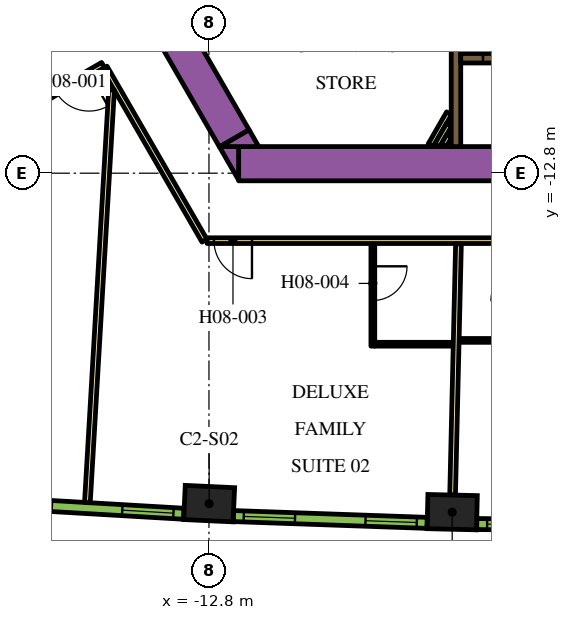
"""IFC4 building model, lengths in metres.
Left out: names, types, materials, properties, quantities, classifications, styles, units other than length and angle.
Written with IfcOpenShell. Run it as: python <this file> out.ifc"""

import sys

from ifc_helpers import new_model, si_unit, direction, frame, frame_2d, origin, origin_2d, place, context, subcontext, project, spatial, polyline, rectangle, outline, extrude, element, fill, save


model = new_model("IFC4")
c1 = context("Model", 3, precision=1e-05, world=origin(), true_north=direction((0.0, 1.0)))
c2 = subcontext(c1, "Body", "Model", "MODEL_VIEW")
j1 = project(units=[si_unit("LENGTHUNIT", "METRE"), si_unit("PLANEANGLEUNIT", "RADIAN")], contexts=[c1])
p1 = place(None, origin())
s1 = spatial("IfcSite", under=j1, at=p1, CompositionType="ELEMENT")
p2 = place(p1, origin())
s2 = spatial("IfcBuilding", under=s1, at=p2, CompositionType="ELEMENT")
p3 = place(p2, frame((0.0, 0.0, 111.0)))
s3 = spatial("IfcBuildingStorey", under=s2, at=p3, CompositionType="ELEMENT", Elevation=111.0)
for number, where, z_axis, x_axis in (
    (1, (-12.795, -21.494, 0.0), (0.0, 0.0, 1.0), (0.999, -0.047, 0.0)),
    (2, (-6.399, -21.719, 0.0), (0.0, 0.0, 1.0), (1.0, -0.023, 0.0)),
):
    element("IfcColumn", number, at=place(p3, frame(where, z_axis=z_axis, x_axis=x_axis)), inside=s3, PredefinedType="COLUMN", context=c2, shape_type="SweptSolid", body=[
        extrude(rectangle(XDim=1.3, YDim=0.9, at=origin_2d()), origin(), (0.0, 0.0, 1.0), 3.9),
    ])
p4 = place(p3, frame((-12.019, -12.55, 0.0), z_axis=(0.0, 0.0, 1.0), x_axis=(1.0, 0.0, 0.0)))
e3 = element("IfcWall", 3, at=p4, inside=s3, PredefinedType="SOLIDWALL", context=c2, shape_type="SweptSolid", body=[
    extrude(rectangle(XDim=21.63, YDim=0.9, at=frame_2d((10.815, 0.0))), origin(), (0.0, 0.0, 1.0), 3.9),
])
p5 = place(p3, origin())
e4 = element("IfcWall", 4, at=p5, inside=s3, PredefinedType="SOLIDWALL", context=c2, shape_type="SweptSolid", body=[
    extrude(outline(polyline([(-12.529, -12.1), (-12.021, -12.1), (-12.021, -12.98), (-12.529, -12.1)])), origin(), (0.0, 0.0, 1.0), 3.9),
])
p6 = place(p3, frame((-12.134, -11.883, 0.0), z_axis=(0.0, 0.0, 1.0), x_axis=(-0.500005339912, 0.866022320763, 0.0)))
e5 = element("IfcWall", 5, at=p6, inside=s3, PredefinedType="SOLIDWALL", context=c2, shape_type="SweptSolid", body=[
    extrude(rectangle(XDim=9.488, YDim=0.9, at=frame_2d((4.744, 0.0))), origin(), (0.0, 0.0, 1.0), 3.9),
])
e6 = element("IfcWall", 6, at=p5, inside=s3, PredefinedType="SOLIDWALL", context=c2, shape_type="SweptSolid", body=[
    extrude(outline(polyline([(-11.489, -12.1), (-12.505, -12.1), (-11.743, -11.66), (-11.489, -12.1)])), origin(), (0.0, 0.0, 1.0), 3.9),
])
p7 = place(p3, frame((-6.3, -12.1, 0.0), z_axis=(0.0, 0.0, 1.0), x_axis=(0.0, 1.0, 0.0)))
e7 = element("IfcWall", 7, at=p7, inside=s3, PredefinedType="SOLIDWALL", context=c2, shape_type="SweptSolid", body=[
    extrude(rectangle(XDim=3.146, YDim=0.25, at=frame_2d((1.573, 0.0))), origin(), (0.0, 0.0, 1.0), 3.9),
])
p8 = place(p3, frame((-6.968, -12.068, 0.0), z_axis=(0.0, 0.0, 1.0), x_axis=(0.49998975084, 0.866031321059, 0.0)))
e8 = element("IfcWall", 8, at=p8, inside=s3, PredefinedType="PARTITIONING", context=c2, shape_type="SweptSolid", body=[
    extrude(rectangle(XDim=0.975, YDim=0.15, at=frame_2d((0.488, 0.0))), origin(), (0.0, 0.0, 1.0), 2.75),
])
p9 = place(p3, frame((-6.794, -12.068, 0.0), z_axis=(0.0, 0.0, 1.0), x_axis=(0.49985693963, 0.866107983974, 0.0)))
e9 = element("IfcWall", 9, at=p9, inside=s3, PredefinedType="PARTITIONING", context=c2, shape_type="SweptSolid", body=[
    extrude(rectangle(XDim=0.629, YDim=0.15, at=frame_2d((0.314, 0.0))), origin(), (0.0, 0.0, 1.0), 2.75),
])
p10 = place(p3, frame((-6.621, -12.068, 0.0), z_axis=(0.0, 0.0, 1.0), x_axis=(0.500046963369, 0.865998287773, 0.0)))
e10 = element("IfcWall", 10, at=p10, inside=s3, PredefinedType="PARTITIONING", context=c2, shape_type="SweptSolid", body=[
    extrude(rectangle(XDim=0.282, YDim=0.15, at=frame_2d((0.141, 0.0))), origin(), (0.0, 0.0, 1.0), 2.75),
])
p11 = place(p3, frame((-6.175, -9.775, 0.0), z_axis=(0.0, 0.0, 1.0), x_axis=(1.0, 0.0, 0.0)))
e11 = element("IfcWall", 11, at=p11, inside=s3, PredefinedType="SOLIDWALL", context=c2, shape_type="SweptSolid", body=[
    extrude(rectangle(XDim=12.35, YDim=0.25, at=frame_2d((6.175, 0.0))), origin(), (0.0, 0.0, 1.0), 3.9),
])
p12 = place(p11, frame((0.585, 0.0, 0.0)))
e12 = element("IfcOpeningElement", 12, at=p12, cuts=e11, PredefinedType="OPENING", context=c2, shape_type="SweptSolid", body=[
    extrude(rectangle(XDim=1.1, YDim=2.1, at=frame_2d((0.55, 1.05))), frame((0.0, 0.135, 0.0), z_axis=(0.0, -1.0, 0.0), x_axis=(1.0, 0.0, 0.0)), (0.0, 0.0, 1.0), 0.27),
])
p13 = place(p11, frame((3.105, 0.0, 0.0)))
e13 = element("IfcOpeningElement", 13, at=p13, cuts=e11, PredefinedType="OPENING", context=c2, shape_type="SweptSolid", body=[
    extrude(rectangle(XDim=1.1, YDim=2.1, at=frame_2d((0.55, 1.05))), frame((0.0, 0.135, 0.0), z_axis=(0.0, -1.0, 0.0), x_axis=(1.0, 0.0, 0.0)), (0.0, 0.0, 1.0), 0.27),
])
p14 = place(p11, frame((5.625, 0.0, 0.0)))
e14 = element("IfcOpeningElement", 14, at=p14, cuts=e11, PredefinedType="OPENING", context=c2, shape_type="SweptSolid", body=[
    extrude(rectangle(XDim=1.1, YDim=2.1, at=frame_2d((0.55, 1.05))), frame((0.0, 0.135, 0.0), z_axis=(0.0, -1.0, 0.0), x_axis=(1.0, 0.0, 0.0)), (0.0, 0.0, 1.0), 0.27),
])
p15 = place(p11, frame((8.145, 0.0, 0.0)))
e15 = element("IfcOpeningElement", 15, at=p15, cuts=e11, PredefinedType="OPENING", context=c2, shape_type="SweptSolid", body=[
    extrude(rectangle(XDim=1.1, YDim=2.1, at=frame_2d((0.55, 1.05))), frame((0.0, 0.135, 0.0), z_axis=(0.0, -1.0, 0.0), x_axis=(1.0, 0.0, 0.0)), (0.0, 0.0, 1.0), 0.27),
])
p16 = place(p11, frame((10.665, 0.0, 0.0)))
e16 = element("IfcOpeningElement", 16, at=p16, cuts=e11, PredefinedType="OPENING", context=c2, shape_type="SweptSolid", body=[
    extrude(rectangle(XDim=1.1, YDim=2.1, at=frame_2d((0.55, 1.05))), frame((0.0, 0.135, 0.0), z_axis=(0.0, -1.0, 0.0), x_axis=(1.0, 0.0, 0.0)), (0.0, 0.0, 1.0), 0.27),
])
p17 = place(p3, frame((-28.211, -15.335, 0.0), z_axis=(0.0, 0.0, 1.0), x_axis=(0.866025884867, 0.49999916674, 0.0)))
e17 = element("IfcWall", 17, at=p17, inside=s3, PredefinedType="PARTITIONING", context=c2, shape_type="SweptSolid", body=[
    extrude(rectangle(XDim=13.543, YDim=0.15, at=frame_2d((6.772, 0.0))), origin(), (0.0, 0.0, 1.0), 2.75),
])
p18 = place(p17, frame((12.114, 0.0, 0.0)))
e18 = element("IfcOpeningElement", 18, at=p18, cuts=e17, PredefinedType="OPENING", context=c2, shape_type="SweptSolid", body=[
    extrude(rectangle(XDim=1.1, YDim=2.1, at=frame_2d((0.55, 1.05))), frame((0.0, 0.085, 0.0), z_axis=(0.0, -1.0, 0.0), x_axis=(1.0, 0.0, 0.0)), (0.0, 0.0, 1.0), 0.17),
])
p19 = place(p17, frame((4.65, 0.0, 0.0)))
e19 = element("IfcOpeningElement", 19, at=p19, cuts=e17, PredefinedType="OPENING", context=c2, shape_type="SweptSolid", body=[
    extrude(rectangle(XDim=1.0, YDim=2.1, at=frame_2d((0.5, 1.05))), frame((0.0, 0.085, 0.0), z_axis=(0.0, -1.0, 0.0), x_axis=(1.0, 0.0, 0.0)), (0.0, 0.0, 1.0), 0.17),
])
p20 = place(p3, frame((-15.587, -9.952, 0.0), z_axis=(0.0, 0.0, 1.0), x_axis=(-0.866017869832, -0.500013048961, 0.0)))
e20 = element("IfcWall", 20, at=p20, inside=s3, PredefinedType="PARTITIONING", context=c2, shape_type="SweptSolid", body=[
    extrude(rectangle(XDim=13.624, YDim=0.15, at=frame_2d((6.812, 0.0))), origin(), (0.0, 0.0, 1.0), 2.75),
])
p21 = place(p20, frame((0.427, 0.0, 0.0)))
e21 = element("IfcOpeningElement", 21, at=p21, cuts=e20, PredefinedType="OPENING", context=c2, shape_type="SweptSolid", body=[
    extrude(rectangle(XDim=1.0, YDim=2.1, at=frame_2d((0.5, 1.05))), frame((0.0, 0.085, 0.0), z_axis=(0.0, -1.0, 0.0), x_axis=(1.0, 0.0, 0.0)), (0.0, 0.0, 1.0), 0.17),
])
p22 = place(p3, frame((-12.918, -14.575, 0.0), z_axis=(0.0, 0.0, 1.0), x_axis=(-0.500009150678, 0.866020120573, 0.0)))
e22 = element("IfcWall", 22, at=p22, inside=s3, PredefinedType="PARTITIONING", context=c2, shape_type="SweptSolid", body=[
    extrude(rectangle(XDim=5.258, YDim=0.15, at=frame_2d((2.629, 0.0))), origin(), (0.0, 0.0, 1.0), 2.75),
])
p23 = place(p3, frame((12.918, -14.575, 0.0), z_axis=(0.0, 0.0, 1.0), x_axis=(-1.0, 0.0, 0.0)))
e23 = element("IfcWall", 23, at=p23, inside=s3, PredefinedType="PARTITIONING", context=c2, shape_type="SweptSolid", body=[
    extrude(rectangle(XDim=25.766, YDim=0.15, at=frame_2d((12.883, 0.0))), origin(), (0.0, 0.0, 1.0), 2.75),
])
p24 = place(p23, frame((24.586, 0.0, 0.0)))
e24 = element("IfcOpeningElement", 24, at=p24, cuts=e23, PredefinedType="OPENING", context=c2, shape_type="SweptSolid", body=[
    extrude(rectangle(XDim=1.0, YDim=2.1, at=frame_2d((0.5, 1.05))), frame((0.0, 0.085, 0.0), z_axis=(0.0, -1.0, 0.0), x_axis=(1.0, 0.0, 0.0)), (0.0, 0.0, 1.0), 0.17),
])
p25 = place(p23, frame((13.144, 0.0, 0.0)))
e25 = element("IfcOpeningElement", 25, at=p25, cuts=e23, PredefinedType="OPENING", context=c2, shape_type="SweptSolid", body=[
    extrude(rectangle(XDim=1.0, YDim=2.1, at=frame_2d((0.5, 1.05))), frame((0.0, 0.085, 0.0), z_axis=(0.0, -1.0, 0.0), x_axis=(1.0, 0.0, 0.0)), (0.0, 0.0, 1.0), 0.17),
])
p26 = place(p23, frame((10.874, 0.0, 0.0)))
e26 = element("IfcOpeningElement", 26, at=p26, cuts=e23, PredefinedType="OPENING", context=c2, shape_type="SweptSolid", body=[
    extrude(rectangle(XDim=0.9, YDim=2.1, at=frame_2d((0.45, 1.05))), frame((0.0, 0.085, 0.0), z_axis=(0.0, -1.0, 0.0), x_axis=(1.0, 0.0, 0.0)), (0.0, 0.0, 1.0), 0.17),
])
p27 = place(p23, frame((0.596, 0.0, 0.0)))
e27 = element("IfcOpeningElement", 27, at=p27, cuts=e23, PredefinedType="OPENING", context=c2, shape_type="SweptSolid", body=[
    extrude(rectangle(XDim=1.0, YDim=2.1, at=frame_2d((0.5, 1.05))), frame((0.0, 0.085, 0.0), z_axis=(0.0, -1.0, 0.0), x_axis=(1.0, 0.0, 0.0)), (0.0, 0.0, 1.0), 0.17),
])
p28 = place(p3, frame((-15.999, -21.467, 0.0), z_axis=(0.0, 0.0, 1.0), x_axis=(0.058411453297, 0.998292593443, 0.0)))
e28 = element("IfcWall", 28, at=p28, inside=s3, PredefinedType="PARTITIONING", context=c2, shape_type="SweptSolid", body=[
    extrude(rectangle(XDim=10.875, YDim=0.15, at=frame_2d((5.438, 0.0))), origin(), (0.0, 0.0, 1.0), 2.75),
])
p29 = place(p3, frame((-6.389, -21.269, 0.0), z_axis=(0.0, 0.0, 1.0), x_axis=(0.023377429176, 0.999726710559, 0.0)))
e29 = element("IfcWall", 29, at=p29, inside=s3, PredefinedType="PARTITIONING", context=c2, shape_type="SweptSolid", body=[
    extrude(rectangle(XDim=6.611, YDim=0.15, at=frame_2d((3.305, 0.0))), origin(), (0.0, 0.0, 1.0), 2.75),
])
p30 = place(p3, frame((-8.488, -14.65, 0.0), z_axis=(0.0, 0.0, 1.0), x_axis=(0.0, -1.0, 0.0)))
e30 = element("IfcWall", 30, at=p30, inside=s3, PredefinedType="PARTITIONING", context=c2, shape_type="SweptSolid", body=[
    extrude(rectangle(XDim=2.7, YDim=0.1, at=frame_2d((1.35, 0.0))), origin(), (0.0, 0.0, 1.0), 2.75),
])
p31 = place(p30, frame((0.6, 0.0, 0.0)))
e31 = element("IfcOpeningElement", 31, at=p31, cuts=e30, PredefinedType="OPENING", context=c2, shape_type="SweptSolid", body=[
    extrude(rectangle(XDim=0.9, YDim=2.1, at=frame_2d((0.45, 1.05))), frame((0.0, 0.06, 0.0), z_axis=(0.0, -1.0, 0.0), x_axis=(1.0, 0.0, 0.0)), (0.0, 0.0, 1.0), 0.12),
])
p32 = place(p3, frame((-8.438, -17.3, 0.0), z_axis=(0.0, 0.0, 1.0), x_axis=(1.0, 0.0, 0.0)))
e32 = element("IfcWall", 32, at=p32, inside=s3, PredefinedType="PARTITIONING", context=c2, shape_type="SweptSolid", body=[
    extrude(rectangle(XDim=2.06, YDim=0.1, at=frame_2d((1.03, 0.0))), origin(), (0.0, 0.0, 1.0), 2.75),
])
p33 = place(p3, frame((-4.53, -17.2, 0.0), z_axis=(0.0, 0.0, 1.0), x_axis=(-1.0, 0.0, 0.0)))
e33 = element("IfcWall", 33, at=p33, inside=s3, PredefinedType="PARTITIONING", context=c2, shape_type="SweptSolid", body=[
    extrude(rectangle(XDim=1.68, YDim=0.1, at=frame_2d((0.84, 0.0))), origin(), (0.0, 0.0, 1.0), 2.75),
])
p34 = place(p3, frame((-18.553, -21.463, 0.0), z_axis=(0.0, 0.0, 1.0), x_axis=(0.998290511436, -0.058447025388, 0.0)))
e34 = element("IfcWall", 34, at=p34, inside=s3, PredefinedType="SOLIDWALL", context=c2, shape_type="SweptSolid", body=[
    extrude(rectangle(XDim=5.1, YDim=0.29, at=frame_2d((2.55, 0.0))), origin(), (0.0, 0.0, 1.0), 3.65),
])
p35 = place(p34, frame((0.273, 0.0, 0.9)))
e35 = element("IfcOpeningElement", 35, at=p35, cuts=e34, PredefinedType="OPENING", context=c2, shape_type="SweptSolid", body=[
    extrude(rectangle(XDim=1.35, YDim=2.15, at=frame_2d((0.675, 1.075))), frame((0.0, 0.155, 0.0), z_axis=(0.0, -1.0, 0.0), x_axis=(1.0, 0.0, 0.0)), (0.0, 0.0, 1.0), 0.31),
])
p36 = place(p34, frame((3.478, 0.0, 0.9)))
e36 = element("IfcOpeningElement", 36, at=p36, cuts=e34, PredefinedType="OPENING", context=c2, shape_type="SweptSolid", body=[
    extrude(rectangle(XDim=1.35, YDim=2.15, at=frame_2d((0.675, 1.075))), frame((0.0, 0.155, 0.0), z_axis=(0.0, -1.0, 0.0), x_axis=(1.0, 0.0, 0.0)), (0.0, 0.0, 1.0), 0.31),
])
p37 = place(p3, frame((-12.157, -21.822, 0.0), z_axis=(0.0, 0.0, 1.0), x_axis=(0.999385993957, -0.035037623812, 0.0)))
e37 = element("IfcWall", 37, at=p37, inside=s3, PredefinedType="SOLIDWALL", context=c2, shape_type="SweptSolid", body=[
    extrude(rectangle(XDim=5.101, YDim=0.29, at=frame_2d((2.55, 0.0))), origin(), (0.0, 0.0, 1.0), 3.65),
])
p38 = place(p37, frame((0.273, 0.0, 0.9)))
e38 = element("IfcOpeningElement", 38, at=p38, cuts=e37, PredefinedType="OPENING", context=c2, shape_type="SweptSolid", body=[
    extrude(rectangle(XDim=1.35, YDim=2.15, at=frame_2d((0.675, 1.075))), frame((0.0, 0.155, 0.0), z_axis=(0.0, -1.0, 0.0), x_axis=(1.0, 0.0, 0.0)), (0.0, 0.0, 1.0), 0.31),
])
p39 = place(p37, frame((3.478, 0.0, 0.9)))
e39 = element("IfcOpeningElement", 39, at=p39, cuts=e37, PredefinedType="OPENING", context=c2, shape_type="SweptSolid", body=[
    extrude(rectangle(XDim=1.35, YDim=2.15, at=frame_2d((0.675, 1.075))), frame((0.0, 0.155, 0.0), z_axis=(0.0, -1.0, 0.0), x_axis=(1.0, 0.0, 0.0)), (0.0, 0.0, 1.0), 0.31),
])
p40 = place(p3, frame((-5.753, -22.031, 0.0), z_axis=(0.0, 0.0, 1.0), x_axis=(0.999931786565, -0.011679992145, 0.0)))
e40 = element("IfcWall", 40, at=p40, inside=s3, PredefinedType="SOLIDWALL", context=c2, shape_type="SweptSolid", body=[
    extrude(rectangle(XDim=5.1, YDim=0.29, at=frame_2d((2.55, 0.0))), origin(), (0.0, 0.0, 1.0), 3.65),
])
p41 = place(p40, frame((0.272, 0.0, 0.9)))
e41 = element("IfcOpeningElement", 41, at=p41, cuts=e40, PredefinedType="OPENING", context=c2, shape_type="SweptSolid", body=[
    extrude(rectangle(XDim=1.35, YDim=2.15, at=frame_2d((0.675, 1.075))), frame((0.0, 0.155, 0.0), z_axis=(0.0, -1.0, 0.0), x_axis=(1.0, 0.0, 0.0)), (0.0, 0.0, 1.0), 0.31),
])
p42 = place(p40, frame((3.478, 0.0, 0.9)))
e42 = element("IfcOpeningElement", 42, at=p42, cuts=e40, PredefinedType="OPENING", context=c2, shape_type="SweptSolid", body=[
    extrude(rectangle(XDim=1.35, YDim=2.15, at=frame_2d((0.675, 1.075))), frame((0.0, 0.155, 0.0), z_axis=(0.0, -1.0, 0.0), x_axis=(1.0, 0.0, 0.0)), (0.0, 0.0, 1.0), 0.31),
])
p43 = place(p12, origin())
e43 = element("IfcDoor", 43, at=p43, inside=s3, OperationType="DOUBLE_DOOR_SLIDING", PredefinedType="DOOR", context=c2, shape_type="SweptSolid", body=[
    extrude(rectangle(XDim=1.1, YDim=2.1, at=frame_2d((0.55, 1.05))), frame((0.0, 0.025, 0.0), z_axis=(0.0, -1.0, 0.0), x_axis=(1.0, 0.0, 0.0)), (0.0, 0.0, 1.0), 0.05),
])
fill(e12, e43)
p44 = place(p21, origin())
e44 = element("IfcDoor", 44, at=p44, inside=s3, OperationType="SINGLE_SWING_LEFT", PredefinedType="DOOR", context=c2, shape_type="SweptSolid", body=[
    extrude(rectangle(XDim=1.0, YDim=2.1, at=frame_2d((0.5, 1.05))), frame((0.0, 0.025, 0.0), z_axis=(0.0, -1.0, 0.0), x_axis=(1.0, 0.0, 0.0)), (0.0, 0.0, 1.0), 0.05),
])
fill(e21, e44)
p45 = place(p24, origin())
e45 = element("IfcDoor", 45, at=p45, inside=s3, OperationType="SINGLE_SWING_RIGHT", PredefinedType="DOOR", context=c2, shape_type="SweptSolid", body=[
    extrude(rectangle(XDim=1.0, YDim=2.1, at=frame_2d((0.5, 1.05))), frame((0.0, 0.025, 0.0), z_axis=(0.0, -1.0, 0.0), x_axis=(1.0, 0.0, 0.0)), (0.0, 0.0, 1.0), 0.05),
])
fill(e24, e45)
p46 = place(p31, origin())
e46 = element("IfcDoor", 46, at=p46, inside=s3, OperationType="SINGLE_SWING_LEFT", PredefinedType="DOOR", context=c2, shape_type="SweptSolid", body=[
    extrude(rectangle(XDim=0.9, YDim=2.1, at=frame_2d((0.45, 1.05))), frame((0.0, 0.025, 0.0), z_axis=(0.0, -1.0, 0.0), x_axis=(1.0, 0.0, 0.0)), (0.0, 0.0, 1.0), 0.05),
])
fill(e31, e46)
p47 = place(p36, origin())
e47 = element("IfcWindow", 47, at=p47, inside=s3, PartitioningType="DOUBLE_PANEL_VERTICAL", PredefinedType="WINDOW", context=c2, shape_type="SweptSolid", body=[
    extrude(rectangle(XDim=1.35, YDim=2.15, at=frame_2d((0.675, 1.075))), frame((0.0, 0.015, 0.0), z_axis=(0.0, -1.0, 0.0), x_axis=(1.0, 0.0, 0.0)), (0.0, 0.0, 1.0), 0.06),
])
fill(e36, e47)
p48 = place(p38, origin())
e48 = element("IfcWindow", 48, at=p48, inside=s3, PartitioningType="DOUBLE_PANEL_VERTICAL", PredefinedType="WINDOW", context=c2, shape_type="SweptSolid", body=[
    extrude(rectangle(XDim=1.35, YDim=2.15, at=frame_2d((0.675, 1.075))), frame((0.0, 0.015, 0.0), z_axis=(0.0, -1.0, 0.0), x_axis=(1.0, 0.0, 0.0)), (0.0, 0.0, 1.0), 0.06),
])
fill(e38, e48)
p49 = place(p39, origin())
e49 = element("IfcWindow", 49, at=p49, inside=s3, PartitioningType="DOUBLE_PANEL_VERTICAL", PredefinedType="WINDOW", context=c2, shape_type="SweptSolid", body=[
    extrude(rectangle(XDim=1.35, YDim=2.15, at=frame_2d((0.675, 1.075))), frame((0.0, 0.015, 0.0), z_axis=(0.0, -1.0, 0.0), x_axis=(1.0, 0.0, 0.0)), (0.0, 0.0, 1.0), 0.06),
])
fill(e39, e49)
p50 = place(p41, origin())
e50 = element("IfcWindow", 50, at=p50, inside=s3, PartitioningType="DOUBLE_PANEL_VERTICAL", PredefinedType="WINDOW", context=c2, shape_type="SweptSolid", body=[
    extrude(rectangle(XDim=1.35, YDim=2.15, at=frame_2d((0.675, 1.075))), frame((0.0, 0.015, 0.0), z_axis=(0.0, -1.0, 0.0), x_axis=(1.0, 0.0, 0.0)), (0.0, 0.0, 1.0), 0.06),
])
fill(e41, e50)
save(model, sys.argv[1])
